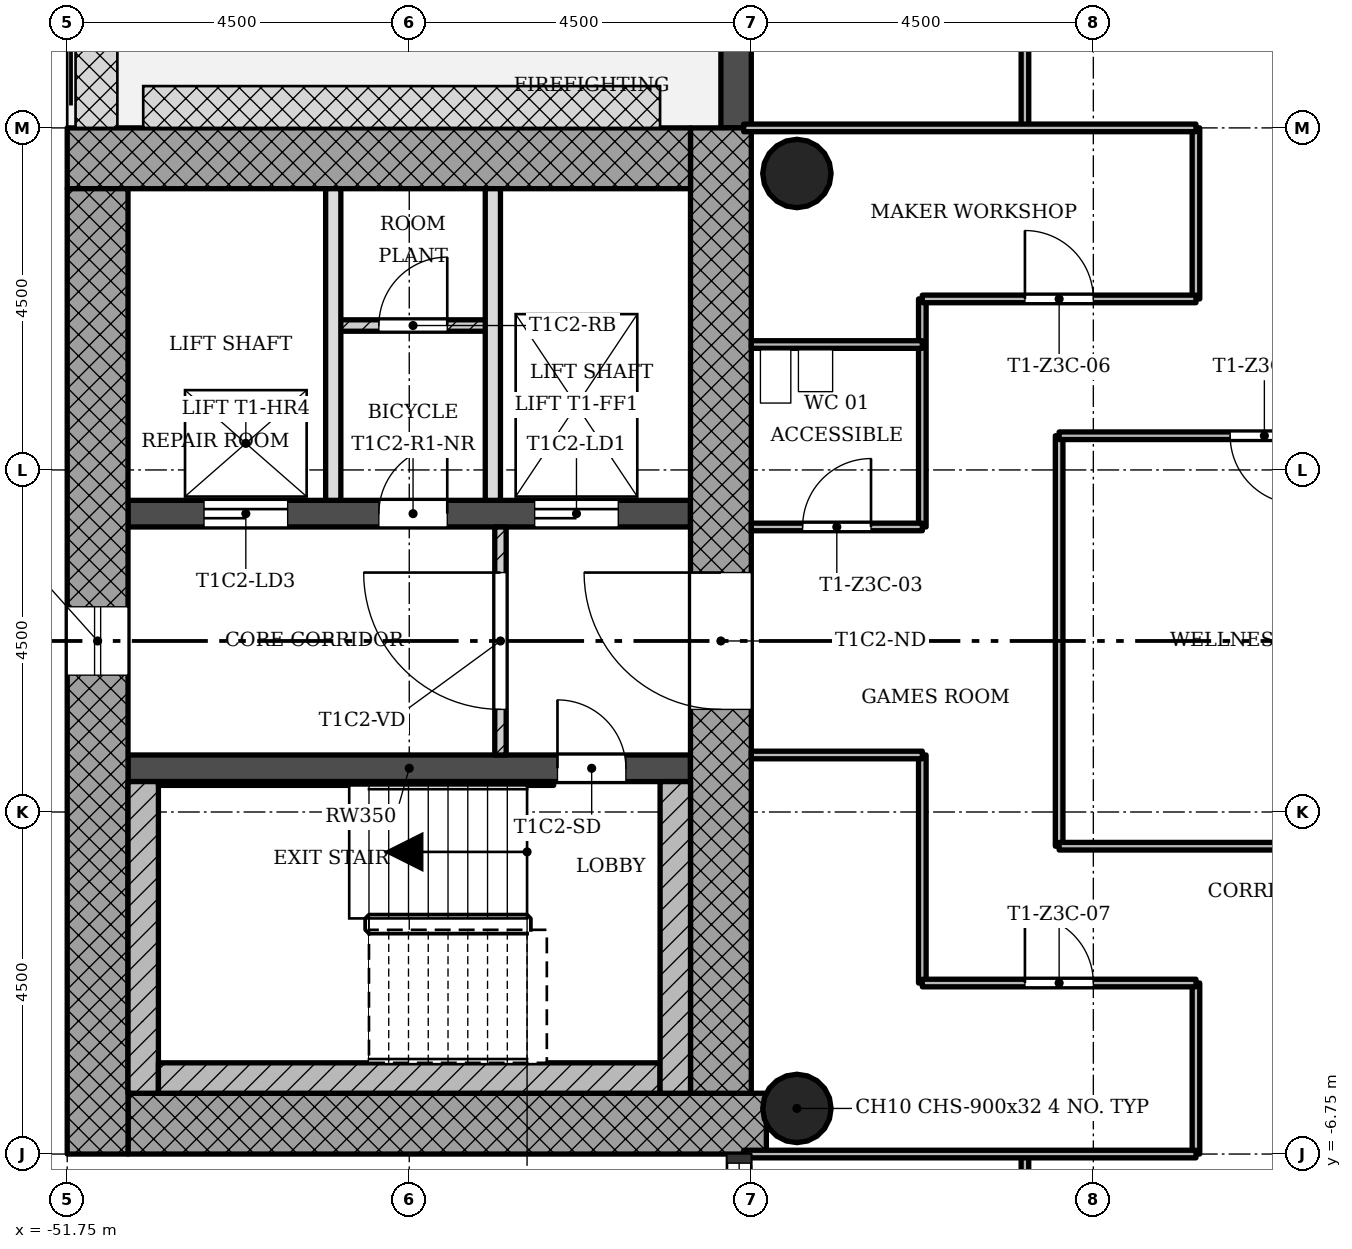
"""IFC4 building model, lengths in metres.
Left out: names, types, materials, properties, quantities, classifications, styles, units other than length and angle.
Written with IfcOpenShell. Run it as: python <this file> out.ifc"""

import sys

from ifc_helpers import new_model, si_unit, direction, frame, frame_2d, origin, origin_2d, place, context, subcontext, project, spatial, rectangle, hollow_circle, extrude, element, fill, save


model = new_model("IFC4")
c1 = context("Model", 3, precision=1e-05, world=origin(), true_north=direction((0.0, 1.0)))
c2 = subcontext(c1, "Body", "Model", "MODEL_VIEW")
j1 = project(units=[si_unit("LENGTHUNIT", "METRE"), si_unit("PLANEANGLEUNIT", "RADIAN")], contexts=[c1])
p1 = place(None, origin())
s1 = spatial("IfcSite", under=j1, at=p1, CompositionType="ELEMENT")
p2 = place(p1, origin())
s2 = spatial("IfcBuilding", under=s1, at=p2, CompositionType="ELEMENT")
p3 = place(p2, frame((0.0, 0.0, 154.1)))
s3 = spatial("IfcBuildingStorey", under=s2, at=p3, CompositionType="ELEMENT", Elevation=154.1)
p4 = place(p3, frame((-50.95, -6.35, 0.0), z_axis=(0.0, 0.0, 1.0), x_axis=(1.0, 0.0, 0.0)))
e1 = element("IfcWall", 1, at=p4, inside=s3, PredefinedType="SHEAR", context=c2, shape_type="SweptSolid", body=[
    extrude(rectangle(XDim=8.398, YDim=0.8, at=frame_2d((4.199, 0.0))), origin(), (0.0, 0.0, 1.0), 3.4),
])
p5 = place(p3, frame((-43.15, -5.95, 0.0), z_axis=(0.0, 0.0, 1.0), x_axis=(0.0, 1.0, 0.0)))
e2 = element("IfcWall", 2, at=p5, inside=s3, PredefinedType="SHEAR", context=c2, shape_type="SweptSolid", body=[
    extrude(rectangle(XDim=12.7, YDim=0.8, at=frame_2d((6.35, 0.0))), origin(), (0.0, 0.0, 1.0), 3.4),
])
p6 = place(p5, frame((5.05, 0.0, 0.0)))
e3 = element("IfcOpeningElement", 3, at=p6, cuts=e2, PredefinedType="OPENING", context=c2, shape_type="SweptSolid", body=[
    extrude(rectangle(XDim=1.8, YDim=2.1, at=frame_2d((0.9, 1.05))), frame((0.0, 0.41, 0.0), z_axis=(0.0, -1.0, 0.0), x_axis=(1.0, 0.0, 0.0)), (0.0, 0.0, 1.0), 0.82),
])
p7 = place(p3, frame((-43.55, 6.35, 0.0), z_axis=(0.0, 0.0, 1.0), x_axis=(-1.0, 0.0, 0.0)))
e4 = element("IfcWall", 4, at=p7, inside=s3, PredefinedType="SHEAR", context=c2, shape_type="SweptSolid", body=[
    extrude(rectangle(XDim=8.2, YDim=0.8, at=frame_2d((4.1, 0.0))), origin(), (0.0, 0.0, 1.0), 3.4),
])
p8 = place(p3, frame((-51.35, 5.95, 0.0), z_axis=(0.0, 0.0, 1.0), x_axis=(0.0, -1.0, 0.0)))
e5 = element("IfcWall", 5, at=p8, inside=s3, PredefinedType="SHEAR", context=c2, shape_type="SweptSolid", body=[
    extrude(rectangle(XDim=12.7, YDim=0.8, at=frame_2d((6.35, 0.0))), origin(), (0.0, 0.0, 1.0), 3.4),
])
p9 = place(p8, frame((5.5, 0.0, 0.45)))
e6 = element("IfcOpeningElement", 6, at=p9, cuts=e5, PredefinedType="OPENING", context=c2, shape_type="SweptSolid", body=[
    extrude(rectangle(XDim=0.9, YDim=2.4, at=frame_2d((0.45, 1.2))), frame((0.0, 0.41, 0.0), z_axis=(0.0, -1.0, 0.0), x_axis=(1.0, 0.0, 0.0)), (0.0, 0.0, 1.0), 0.82),
])
p10 = place(p3, frame((-50.95, -1.675, 0.0), z_axis=(0.0, 0.0, 1.0), x_axis=(1.0, 0.0, 0.0)))
e7 = element("IfcWall", 7, at=p10, inside=s3, PredefinedType="SHEAR", context=c2, shape_type="SweptSolid", body=[
    extrude(rectangle(XDim=7.4, YDim=0.35, at=frame_2d((3.7, 0.0))), origin(), (0.0, 0.0, 1.0), 3.4),
])
p11 = place(p10, frame((5.65, 0.0, 0.0)))
e8 = element("IfcOpeningElement", 8, at=p11, cuts=e7, PredefinedType="OPENING", context=c2, shape_type="SweptSolid", body=[
    extrude(rectangle(XDim=0.9, YDim=2.1, at=frame_2d((0.45, 1.05))), frame((0.0, 0.185, 0.0), z_axis=(0.0, -1.0, 0.0), x_axis=(1.0, 0.0, 0.0)), (0.0, 0.0, 1.0), 0.37),
])
p12 = place(p3, frame((-50.95, 1.675, 0.0), z_axis=(0.0, 0.0, 1.0), x_axis=(1.0, 0.0, 0.0)))
e9 = element("IfcWall", 9, at=p12, inside=s3, PredefinedType="SHEAR", context=c2, shape_type="SweptSolid", body=[
    extrude(rectangle(XDim=7.4, YDim=0.35, at=frame_2d((3.7, 0.0))), origin(), (0.0, 0.0, 1.0), 3.4),
])
p13 = place(p12, frame((5.35, 0.0, 0.0)))
e10 = element("IfcOpeningElement", 10, at=p13, cuts=e9, PredefinedType="OPENING", context=c2, shape_type="SweptSolid", body=[
    extrude(rectangle(XDim=1.1, YDim=2.1, at=frame_2d((0.55, 1.05))), frame((0.0, 0.185, 0.0), z_axis=(0.0, -1.0, 0.0), x_axis=(1.0, 0.0, 0.0)), (0.0, 0.0, 1.0), 0.37),
])
p14 = place(p12, frame((1.0, 0.0, 0.0)))
e11 = element("IfcOpeningElement", 11, at=p14, cuts=e9, PredefinedType="OPENING", context=c2, shape_type="SweptSolid", body=[
    extrude(rectangle(XDim=1.1, YDim=2.1, at=frame_2d((0.55, 1.05))), frame((0.0, 0.185, 0.0), z_axis=(0.0, -1.0, 0.0), x_axis=(1.0, 0.0, 0.0)), (0.0, 0.0, 1.0), 0.37),
])
p15 = place(p12, frame((3.3, 0.0, 0.0)))
e12 = element("IfcOpeningElement", 12, at=p15, cuts=e9, PredefinedType="OPENING", context=c2, shape_type="SweptSolid", body=[
    extrude(rectangle(XDim=0.9, YDim=2.1, at=frame_2d((0.45, 1.05))), frame((0.0, 0.185, 0.0), z_axis=(0.0, -1.0, 0.0), x_axis=(1.0, 0.0, 0.0)), (0.0, 0.0, 1.0), 0.37),
])
for number, where, z_axis, x_axis in (
    (13, (-42.15, -6.15, 0.0), (0.0, 0.0, 1.0), (1.0, 0.0, 0.0)),
    (14, (-42.15, 6.15, 0.0), (0.0, 0.0, 1.0), (1.0, 0.0, 0.0)),
):
    element("IfcColumn", number, at=place(p3, frame(where, z_axis=z_axis, x_axis=x_axis)), inside=s3, PredefinedType="COLUMN", context=c2, shape_type="SweptSolid", body=[
        extrude(hollow_circle(Radius=0.45, WallThickness=0.032, at=origin_2d()), origin(), (0.0, 0.0, 1.0), 3.4),
    ])
p16 = place(p3, frame((-42.95, 11.25, -0.02), z_axis=(0.0, 0.0, 1.0), x_axis=(0.0, -1.0, 0.0)))
e15 = element("IfcWall", 15, at=p16, inside=s3, PredefinedType="STANDARD", context=c2, shape_type="SweptSolid", body=[
    extrude(rectangle(XDim=4.5, YDim=0.4, at=frame_2d((2.25, 0.0))), origin(), (0.0, 0.0, 1.0), 3.12),
])
p17 = place(p16, frame((1.35, 0.0, 0.02)))
e16 = element("IfcOpeningElement", 16, at=p17, cuts=e15, PredefinedType="OPENING", context=c2, shape_type="SweptSolid", body=[
    extrude(rectangle(XDim=1.8, YDim=2.1, at=frame_2d((0.9, 1.05))), frame((0.0, 0.21, 0.0), z_axis=(0.0, -1.0, 0.0), x_axis=(1.0, 0.0, 0.0)), (0.0, 0.0, 1.0), 0.42),
])
p18 = place(p3, frame((-46.05, 1.5, 0.0), z_axis=(0.0, 0.0, 1.0), x_axis=(0.0, -1.0, 0.0)))
e17 = element("IfcWall", 17, at=p18, inside=s3, PredefinedType="PARTITIONING", context=c2, shape_type="SweptSolid", body=[
    extrude(rectangle(XDim=3.0, YDim=0.15, at=frame_2d((1.5, 0.0))), origin(), (0.0, 0.0, 1.0), 3.0),
])
p19 = place(p18, frame((0.6, 0.0, 0.0)))
e18 = element("IfcOpeningElement", 18, at=p19, cuts=e17, PredefinedType="OPENING", context=c2, shape_type="SweptSolid", body=[
    extrude(rectangle(XDim=1.8, YDim=2.1, at=frame_2d((0.9, 1.05))), frame((0.0, 0.085, 0.0), z_axis=(0.0, -1.0, 0.0), x_axis=(1.0, 0.0, 0.0)), (0.0, 0.0, 1.0), 0.17),
])
for number, where, z_axis, x_axis in (
    (19, (-48.25, 5.95, 0.0), (0.0, 0.0, 1.0), (0.0, -1.0, 0.0)),
    (20, (-46.15, 5.95, 0.0), (0.0, 0.0, 1.0), (0.0, -1.0, 0.0)),
):
    element("IfcWall", number, at=place(p3, frame(where, z_axis=z_axis, x_axis=x_axis)), inside=s3, PredefinedType="SOLIDWALL", context=c2, shape_type="SweptSolid", body=[
        extrude(rectangle(XDim=4.1, YDim=0.2, at=frame_2d((2.05, 0.0))), origin(), (0.0, 0.0, 1.0), 3.0),
    ])
p20 = place(p3, frame((-46.15, 4.15, 0.0), z_axis=(0.0, 0.0, 1.0), x_axis=(-1.0, 0.0, 0.0)))
e21 = element("IfcWall", 21, at=p20, inside=s3, PredefinedType="PARTITIONING", context=c2, shape_type="SweptSolid", body=[
    extrude(rectangle(XDim=2.1, YDim=0.15, at=frame_2d((1.05, 0.0))), origin(), (0.0, 0.0, 1.0), 3.0),
])
p21 = place(p20, frame((0.6, 0.0, 0.0)))
e22 = element("IfcOpeningElement", 22, at=p21, cuts=e21, PredefinedType="OPENING", context=c2, shape_type="SweptSolid", body=[
    extrude(rectangle(XDim=0.9, YDim=2.1, at=frame_2d((0.45, 1.05))), frame((0.0, 0.085, 0.0), z_axis=(0.0, -1.0, 0.0), x_axis=(1.0, 0.0, 0.0)), (0.0, 0.0, 1.0), 0.17),
])
for number, where, z_axis, x_axis in (
    (23, (-40.5, -4.5, 0.0), (0.0, 0.0, 1.0), (0.0, 1.0, 0.0)),
    (24, (-40.5, 1.5, 0.0), (0.0, 0.0, 1.0), (0.0, 1.0, 0.0)),
):
    element("IfcWall", number, at=place(p3, frame(where, z_axis=z_axis, x_axis=x_axis)), inside=s3, PredefinedType="PARTITIONING", context=c2, shape_type="SweptSolid", body=[
        extrude(rectangle(XDim=3.0, YDim=0.1, at=frame_2d((1.5, 0.0))), origin(), (0.0, 0.0, 1.0), 3.0),
    ])
p22 = place(p3, frame((-39.15, -15.75, 0.0), z_axis=(0.0, 0.0, 1.0), x_axis=(0.0, 1.0, 0.0)))
e25 = element("IfcWall", 25, at=p22, inside=s3, PredefinedType="PARTITIONING", context=c2, shape_type="SweptSolid", body=[
    extrude(rectangle(XDim=9.0, YDim=0.1, at=frame_2d((4.5, 0.0))), origin(), (0.0, 0.0, 1.0), 3.0),
])
p23 = place(p22, frame((5.55, 0.0, 0.0)))
e26 = element("IfcOpeningElement", 26, at=p23, cuts=e25, PredefinedType="OPENING", context=c2, shape_type="SweptSolid", body=[
    extrude(rectangle(XDim=0.9, YDim=2.1, at=frame_2d((0.45, 1.05))), frame((0.0, 0.06, 0.0), z_axis=(0.0, -1.0, 0.0), x_axis=(1.0, 0.0, 0.0)), (0.0, 0.0, 1.0), 0.12),
])
p24 = place(p3, frame((-39.15, 6.75, 0.0), z_axis=(0.0, 0.0, 1.0), x_axis=(0.0, 1.0, 0.0)))
e27 = element("IfcWall", 27, at=p24, inside=s3, PredefinedType="PARTITIONING", context=c2, shape_type="SweptSolid", body=[
    extrude(rectangle(XDim=4.5, YDim=0.1, at=frame_2d((2.25, 0.0))), origin(), (0.0, 0.0, 1.0), 3.0),
])
p25 = place(p24, frame((1.8, 0.0, 0.0)))
e28 = element("IfcOpeningElement", 28, at=p25, cuts=e27, PredefinedType="OPENING", context=c2, shape_type="SweptSolid", body=[
    extrude(rectangle(XDim=0.9, YDim=2.1, at=frame_2d((0.45, 1.05))), frame((0.0, 0.06, 0.0), z_axis=(0.0, -1.0, 0.0), x_axis=(1.0, 0.0, 0.0)), (0.0, 0.0, 1.0), 0.12),
])
p26 = place(p3, frame((-38.7, -2.7, 0.0), z_axis=(0.0, 0.0, 1.0), x_axis=(0.0, 1.0, 0.0)))
e29 = element("IfcWall", 29, at=p26, inside=s3, PredefinedType="PARTITIONING", context=c2, shape_type="SweptSolid", body=[
    extrude(rectangle(XDim=5.4, YDim=0.1, at=frame_2d((2.7, 0.0))), origin(), (0.0, 0.0, 1.0), 3.0),
])
for number, where, z_axis, x_axis in (
    (30, (-36.9, -6.75, 0.0), (0.0, 0.0, 1.0), (0.0, 1.0, 0.0)),
    (31, (-36.9, 4.5, 0.0), (0.0, 0.0, 1.0), (0.0, 1.0, 0.0)),
):
    element("IfcWall", number, at=place(p3, frame(where, z_axis=z_axis, x_axis=x_axis)), inside=s3, PredefinedType="PARTITIONING", context=c2, shape_type="SweptSolid", body=[
        extrude(rectangle(XDim=2.25, YDim=0.1, at=frame_2d((1.125, 0.0))), origin(), (0.0, 0.0, 1.0), 3.0),
    ])
p27 = place(p3, frame((-42.85, -6.75, 0.0), z_axis=(0.0, 0.0, 1.0), x_axis=(1.0, 0.0, 0.0)))
e32 = element("IfcWall", 32, at=p27, inside=s3, PredefinedType="PARTITIONING", context=c2, shape_type="SweptSolid", body=[
    extrude(rectangle(XDim=5.95, YDim=0.1, at=frame_2d((2.975, 0.0))), origin(), (0.0, 0.0, 1.0), 3.0),
])
p28 = place(p3, frame((-40.5, -4.5, 0.0), z_axis=(0.0, 0.0, 1.0), x_axis=(1.0, 0.0, 0.0)))
e33 = element("IfcWall", 33, at=p28, inside=s3, PredefinedType="PARTITIONING", context=c2, shape_type="SweptSolid", body=[
    extrude(rectangle(XDim=3.6, YDim=0.1, at=frame_2d((1.8, 0.0))), origin(), (0.0, 0.0, 1.0), 3.0),
])
p29 = place(p28, frame((1.35, 0.0, 0.0)))
e34 = element("IfcOpeningElement", 34, at=p29, cuts=e33, PredefinedType="OPENING", context=c2, shape_type="SweptSolid", body=[
    extrude(rectangle(XDim=0.9, YDim=2.1, at=frame_2d((0.45, 1.05))), frame((0.0, 0.06, 0.0), z_axis=(0.0, -1.0, 0.0), x_axis=(1.0, 0.0, 0.0)), (0.0, 0.0, 1.0), 0.12),
])
p30 = place(p3, frame((-38.7, -2.7, 0.0), z_axis=(0.0, 0.0, 1.0), x_axis=(1.0, 0.0, 0.0)))
e35 = element("IfcWall", 35, at=p30, inside=s3, PredefinedType="PARTITIONING", context=c2, shape_type="SweptSolid", body=[
    extrude(rectangle(XDim=5.4, YDim=0.1, at=frame_2d((2.7, 0.0))), origin(), (0.0, 0.0, 1.0), 3.0),
])
p31 = place(p3, frame((-42.75, -1.5, 0.0), z_axis=(0.0, 0.0, 1.0), x_axis=(1.0, 0.0, 0.0)))
e36 = element("IfcWall", 36, at=p31, inside=s3, PredefinedType="PARTITIONING", context=c2, shape_type="SweptSolid", body=[
    extrude(rectangle(XDim=2.25, YDim=0.1, at=frame_2d((1.125, 0.0))), origin(), (0.0, 0.0, 1.0), 3.0),
])
p32 = place(p3, frame((-42.75, 1.5, 0.0), z_axis=(0.0, 0.0, 1.0), x_axis=(1.0, 0.0, 0.0)))
e37 = element("IfcWall", 37, at=p32, inside=s3, PredefinedType="PARTITIONING", context=c2, shape_type="SweptSolid", body=[
    extrude(rectangle(XDim=2.25, YDim=0.1, at=frame_2d((1.125, 0.0))), origin(), (0.0, 0.0, 1.0), 3.0),
])
p33 = place(p32, frame((0.675, 0.0, 0.0)))
e38 = element("IfcOpeningElement", 38, at=p33, cuts=e37, PredefinedType="OPENING", context=c2, shape_type="SweptSolid", body=[
    extrude(rectangle(XDim=0.9, YDim=2.1, at=frame_2d((0.45, 1.05))), frame((0.0, 0.06, 0.0), z_axis=(0.0, -1.0, 0.0), x_axis=(1.0, 0.0, 0.0)), (0.0, 0.0, 1.0), 0.12),
])
p34 = place(p3, frame((-38.7, 2.7, 0.0), z_axis=(0.0, 0.0, 1.0), x_axis=(1.0, 0.0, 0.0)))
e39 = element("IfcWall", 39, at=p34, inside=s3, PredefinedType="PARTITIONING", context=c2, shape_type="SweptSolid", body=[
    extrude(rectangle(XDim=5.4, YDim=0.1, at=frame_2d((2.7, 0.0))), origin(), (0.0, 0.0, 1.0), 3.0),
])
p35 = place(p34, frame((2.25, 0.0, 0.0)))
e40 = element("IfcOpeningElement", 40, at=p35, cuts=e39, PredefinedType="OPENING", context=c2, shape_type="SweptSolid", body=[
    extrude(rectangle(XDim=0.9, YDim=2.1, at=frame_2d((0.45, 1.05))), frame((0.0, 0.06, 0.0), z_axis=(0.0, -1.0, 0.0), x_axis=(1.0, 0.0, 0.0)), (0.0, 0.0, 1.0), 0.12),
])
p36 = place(p3, frame((-42.75, 3.9, 0.0), z_axis=(0.0, 0.0, 1.0), x_axis=(1.0, 0.0, 0.0)))
e41 = element("IfcWall", 41, at=p36, inside=s3, PredefinedType="PARTITIONING", context=c2, shape_type="SweptSolid", body=[
    extrude(rectangle(XDim=2.25, YDim=0.1, at=frame_2d((1.125, 0.0))), origin(), (0.0, 0.0, 1.0), 3.0),
])
p37 = place(p3, frame((-40.5, 4.5, 0.0), z_axis=(0.0, 0.0, 1.0), x_axis=(1.0, 0.0, 0.0)))
e42 = element("IfcWall", 42, at=p37, inside=s3, PredefinedType="PARTITIONING", context=c2, shape_type="SweptSolid", body=[
    extrude(rectangle(XDim=3.6, YDim=0.1, at=frame_2d((1.8, 0.0))), origin(), (0.0, 0.0, 1.0), 3.0),
])
p38 = place(p37, frame((1.35, 0.0, 0.0)))
e43 = element("IfcOpeningElement", 43, at=p38, cuts=e42, PredefinedType="OPENING", context=c2, shape_type="SweptSolid", body=[
    extrude(rectangle(XDim=0.9, YDim=2.1, at=frame_2d((0.45, 1.05))), frame((0.0, 0.06, 0.0), z_axis=(0.0, -1.0, 0.0), x_axis=(1.0, 0.0, 0.0)), (0.0, 0.0, 1.0), 0.12),
])
p39 = place(p3, frame((-42.85, 6.75, 0.0), z_axis=(0.0, 0.0, 1.0), x_axis=(1.0, 0.0, 0.0)))
e44 = element("IfcWall", 44, at=p39, inside=s3, PredefinedType="PARTITIONING", context=c2, shape_type="SweptSolid", body=[
    extrude(rectangle(XDim=5.95, YDim=0.1, at=frame_2d((2.975, 0.0))), origin(), (0.0, 0.0, 1.0), 3.0),
])
p40 = place(p3, frame((-50.75, -1.85, 0.0), z_axis=(0.0, 0.0, 1.0), x_axis=(0.0, -1.0, 0.0)))
e45 = element("IfcWall", 45, at=p40, inside=s3, PredefinedType="SHEAR", context=c2, shape_type="SweptSolid", body=[
    extrude(rectangle(XDim=4.1, YDim=0.4, at=frame_2d((2.05, 0.0))), origin(), (0.0, 0.0, 1.0), 3.4),
])
p41 = place(p3, frame((-43.95, -5.75, 0.0), z_axis=(0.0, 0.0, 1.0), x_axis=(-1.0, 0.0, 0.0)))
e46 = element("IfcWall", 46, at=p41, inside=s3, PredefinedType="SHEAR", context=c2, shape_type="SweptSolid", body=[
    extrude(rectangle(XDim=6.6, YDim=0.4, at=frame_2d((3.3, 0.0))), origin(), (0.0, 0.0, 1.0), 3.4),
])
p42 = place(p3, frame((-43.75, -1.85, 0.0), z_axis=(0.0, 0.0, 1.0), x_axis=(0.0, -1.0, 0.0)))
e47 = element("IfcWall", 47, at=p42, inside=s3, PredefinedType="SHEAR", context=c2, shape_type="SweptSolid", body=[
    extrude(rectangle(XDim=4.1, YDim=0.4, at=frame_2d((2.05, 0.0))), origin(), (0.0, 0.0, 1.0), 3.4),
])
p43 = place(p3, frame((-45.35, -1.875, 0.0), z_axis=(0.0, 0.0, 1.0), x_axis=(-1.0, 0.0, 0.0)))
e48 = element("IfcWall", 48, at=p43, inside=s3, PredefinedType="SHEAR", context=c2, shape_type="SweptSolid", body=[
    extrude(rectangle(XDim=5.2, YDim=0.05, at=frame_2d((2.6, 0.0))), origin(), (0.0, 0.0, 1.0), 3.4),
])
p44 = place(p9, origin())
e49 = element("IfcWindow", 49, at=p44, inside=s3, PartitioningType="SINGLE_PANEL", PredefinedType="WINDOW", context=c2, shape_type="SweptSolid", body=[
    extrude(rectangle(XDim=0.9, YDim=2.4, at=frame_2d((0.45, 1.2))), frame((0.0, 0.03, 0.0), z_axis=(0.0, -1.0, 0.0), x_axis=(1.0, 0.0, 0.0)), (0.0, 0.0, 1.0), 0.06),
])
fill(e6, e49)
p45 = place(p19, origin())
e50 = element("IfcDoor", 50, at=p45, inside=s3, OperationType="SINGLE_SWING_LEFT", PredefinedType="DOOR", context=c2, shape_type="SweptSolid", body=[
    extrude(rectangle(XDim=1.8, YDim=2.1, at=frame_2d((0.9, 1.05))), frame((0.0, 0.025, 0.0), z_axis=(0.0, -1.0, 0.0), x_axis=(1.0, 0.0, 0.0)), (0.0, 0.0, 1.0), 0.05),
])
fill(e18, e50)
p46 = place(p21, origin())
e51 = element("IfcDoor", 51, at=p46, inside=s3, OperationType="SINGLE_SWING_LEFT", PredefinedType="DOOR", context=c2, shape_type="SweptSolid", body=[
    extrude(rectangle(XDim=0.9, YDim=2.1, at=frame_2d((0.45, 1.05))), frame((0.0, 0.025, 0.0), z_axis=(0.0, -1.0, 0.0), x_axis=(1.0, 0.0, 0.0)), (0.0, 0.0, 1.0), 0.05),
])
fill(e22, e51)
p47 = place(p35, origin())
e52 = element("IfcDoor", 52, at=p47, inside=s3, OperationType="SINGLE_SWING_RIGHT", PredefinedType="DOOR", context=c2, shape_type="SweptSolid", body=[
    extrude(rectangle(XDim=0.9, YDim=2.1, at=frame_2d((0.45, 1.05))), frame((0.0, 0.025, 0.0), z_axis=(0.0, -1.0, 0.0), x_axis=(1.0, 0.0, 0.0)), (0.0, 0.0, 1.0), 0.05),
])
fill(e40, e52)
p48 = place(p33, origin())
e53 = element("IfcDoor", 53, at=p48, inside=s3, OperationType="SINGLE_SWING_LEFT", PredefinedType="DOOR", context=c2, shape_type="SweptSolid", body=[
    extrude(rectangle(XDim=0.9, YDim=2.1, at=frame_2d((0.45, 1.05))), frame((0.0, 0.025, 0.0), z_axis=(0.0, -1.0, 0.0), x_axis=(1.0, 0.0, 0.0)), (0.0, 0.0, 1.0), 0.05),
])
fill(e38, e53)
p49 = place(p38, origin())
e54 = element("IfcDoor", 54, at=p49, inside=s3, OperationType="SINGLE_SWING_RIGHT", PredefinedType="DOOR", context=c2, shape_type="SweptSolid", body=[
    extrude(rectangle(XDim=0.9, YDim=2.1, at=frame_2d((0.45, 1.05))), frame((0.0, 0.025, 0.0), z_axis=(0.0, -1.0, 0.0), x_axis=(1.0, 0.0, 0.0)), (0.0, 0.0, 1.0), 0.05),
])
fill(e43, e54)
p50 = place(p29, origin())
e55 = element("IfcDoor", 55, at=p50, inside=s3, OperationType="SINGLE_SWING_RIGHT", PredefinedType="DOOR", context=c2, shape_type="SweptSolid", body=[
    extrude(rectangle(XDim=0.9, YDim=2.1, at=frame_2d((0.45, 1.05))), frame((0.0, 0.025, 0.0), z_axis=(0.0, -1.0, 0.0), x_axis=(1.0, 0.0, 0.0)), (0.0, 0.0, 1.0), 0.05),
])
fill(e34, e55)
p51 = place(p11, origin())
e56 = element("IfcDoor", 56, at=p51, inside=s3, OperationType="SINGLE_SWING_RIGHT", PredefinedType="DOOR", context=c2, shape_type="SweptSolid", body=[
    extrude(rectangle(XDim=0.9, YDim=2.1, at=frame_2d((0.45, 1.05))), frame((0.0, 0.025, 0.0), z_axis=(0.0, -1.0, 0.0), x_axis=(1.0, 0.0, 0.0)), (0.0, 0.0, 1.0), 0.05),
])
fill(e8, e56)
p52 = place(p13, origin())
e57 = element("IfcDoor", 57, at=p52, inside=s3, OperationType="SLIDING_TO_LEFT", PredefinedType="DOOR", context=c2, shape_type="SweptSolid", body=[
    extrude(rectangle(XDim=1.1, YDim=2.1, at=frame_2d((0.55, 1.05))), frame((0.0, 0.025, 0.0), z_axis=(0.0, -1.0, 0.0), x_axis=(1.0, 0.0, 0.0)), (0.0, 0.0, 1.0), 0.05),
])
fill(e10, e57)
p53 = place(p14, origin())
e58 = element("IfcDoor", 58, at=p53, inside=s3, OperationType="SLIDING_TO_LEFT", PredefinedType="DOOR", context=c2, shape_type="SweptSolid", body=[
    extrude(rectangle(XDim=1.1, YDim=2.1, at=frame_2d((0.55, 1.05))), frame((0.0, 0.025, 0.0), z_axis=(0.0, -1.0, 0.0), x_axis=(1.0, 0.0, 0.0)), (0.0, 0.0, 1.0), 0.05),
])
fill(e11, e58)
p54 = place(p15, origin())
e59 = element("IfcDoor", 59, at=p54, inside=s3, OperationType="SINGLE_SWING_LEFT", PredefinedType="DOOR", context=c2, shape_type="SweptSolid", body=[
    extrude(rectangle(XDim=0.9, YDim=2.1, at=frame_2d((0.45, 1.05))), frame((0.0, 0.025, 0.0), z_axis=(0.0, -1.0, 0.0), x_axis=(1.0, 0.0, 0.0)), (0.0, 0.0, 1.0), 0.05),
])
fill(e12, e59)
p55 = place(p6, origin())
e60 = element("IfcDoor", 60, at=p55, inside=s3, OperationType="SINGLE_SWING_LEFT", PredefinedType="DOOR", context=c2, shape_type="SweptSolid", body=[
    extrude(rectangle(XDim=1.8, YDim=2.1, at=frame_2d((0.9, 1.05))), frame((0.0, 0.025, 0.0), z_axis=(0.0, -1.0, 0.0), x_axis=(1.0, 0.0, 0.0)), (0.0, 0.0, 1.0), 0.05),
])
fill(e3, e60)
save(model, sys.argv[1])
